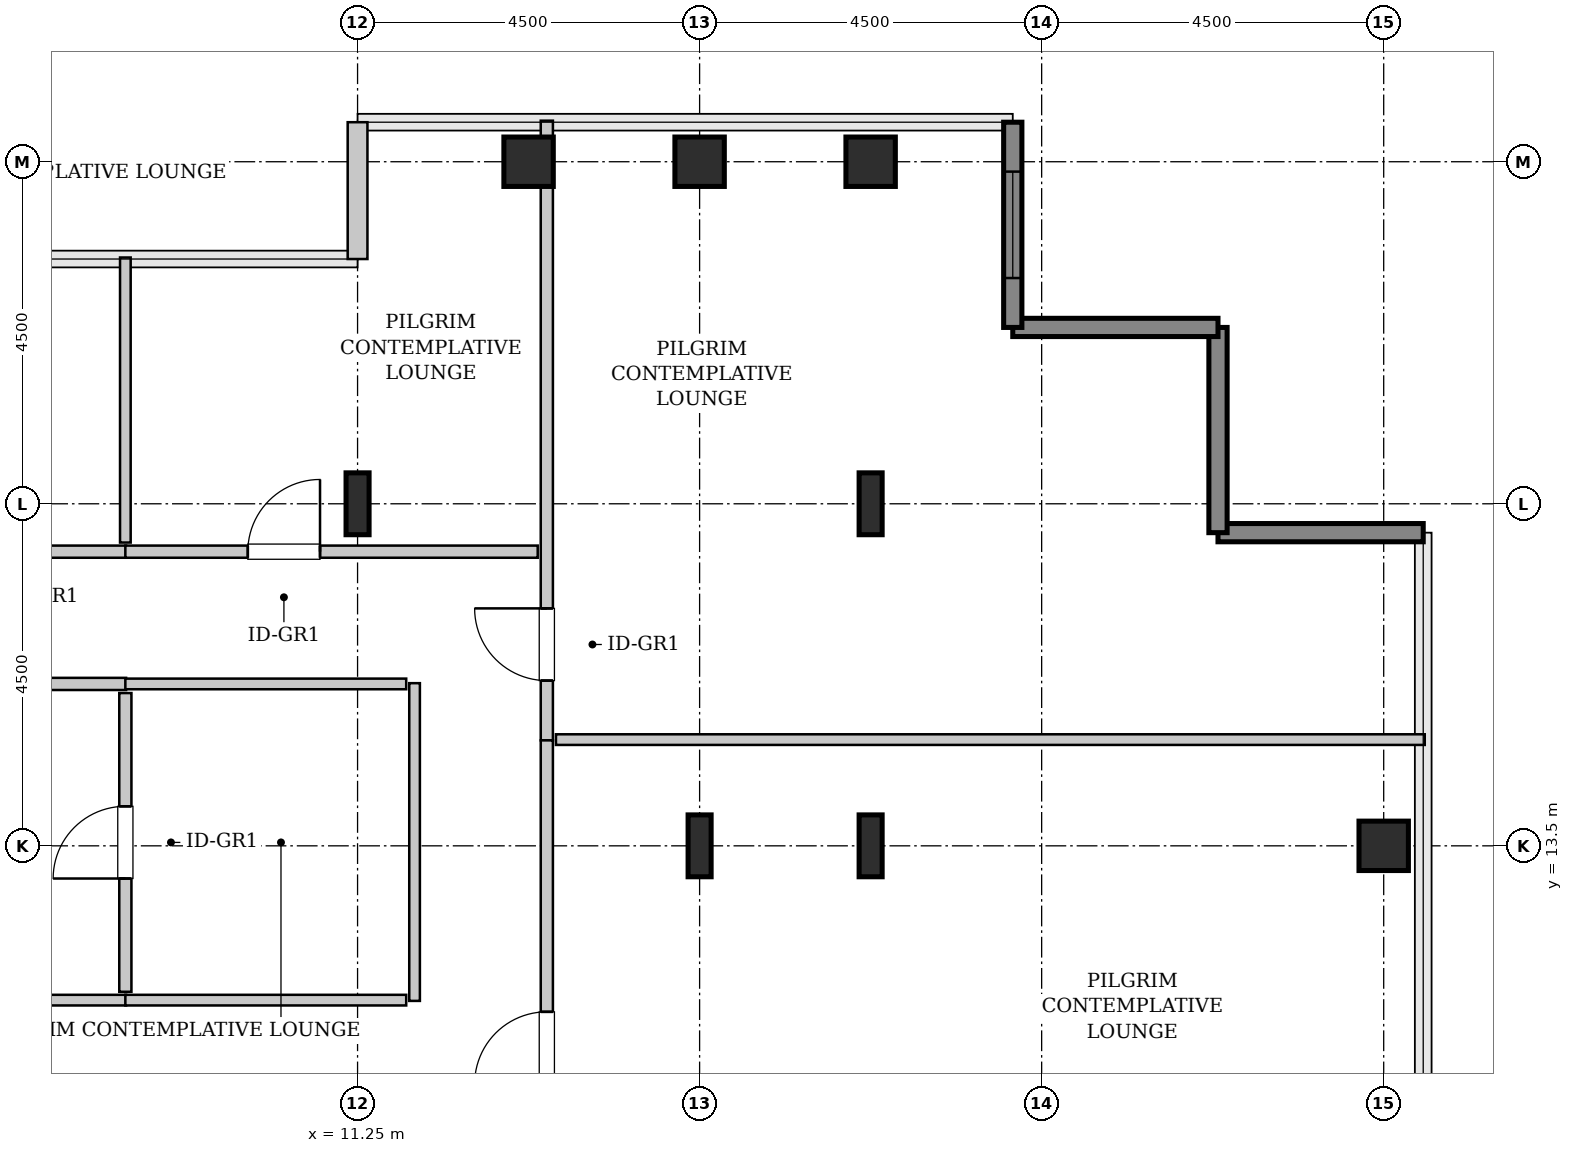
"""IFC4 building model, lengths in metres.
Left out: names, types, materials, properties, quantities, classifications, styles, units other than length and angle.
Written with IfcOpenShell. Run it as: python <this file> out.ifc"""

import sys

from ifc_helpers import new_model, si_unit, direction, frame, frame_2d, origin, origin_2d, place, context, subcontext, project, spatial, rectangle, hollow_rectangle, i_section, extrude, source, transform, mapped, element, fill, save


model = new_model("IFC4")
c1 = context("Model", 3, precision=1e-05, world=origin(), true_north=direction((0.0, 1.0)))
c2 = subcontext(c1, "Body", "Model", "MODEL_VIEW")
j1 = project(units=[si_unit("LENGTHUNIT", "METRE"), si_unit("PLANEANGLEUNIT", "RADIAN")], contexts=[c1])
p1 = place(None, origin())
s1 = spatial("IfcSite", under=j1, at=p1, CompositionType="ELEMENT")
p2 = place(p1, origin())
s2 = spatial("IfcBuilding", under=s1, at=p2, CompositionType="ELEMENT")
p3 = place(p2, frame((0.0, 0.0, 214.2)))
s3 = spatial("IfcBuildingStorey", under=s2, at=p3, CompositionType="ELEMENT", Elevation=214.2)
m1 = source(origin(), c2, "Body", "SweptSolid", [
    extrude(i_section(OverallWidth=0.303, OverallDepth=0.814, WebThickness=0.021, FlangeThickness=0.04, FilletRadius=0.03, at=origin_2d()), origin(), (0.0, 0.0, 1.0), 3.8),
])
p4 = place(p3, frame((11.25, 18.0, 0.0), z_axis=(0.0, 0.0, 1.0), x_axis=(1.0, 0.0, 0.0)))
e1 = element("IfcColumn", 1, at=p4, inside=s3, PredefinedType="COLUMN", context=c2, shape_type="MappedRepresentation", body=[
    mapped(m1, transform((0.0, 0.0, 0.0), x_axis=(1.0, 0.0, 0.0), y_axis=(0.0, 1.0, 0.0), z_axis=(0.0, 0.0, 1.0), scale=1.0)),
])
m2 = source(origin(), c2, "Body", "SweptSolid", [
    extrude(hollow_rectangle(XDim=0.65, YDim=0.65, WallThickness=0.032, InnerFilletRadius=0.032, OuterFilletRadius=0.064, at=origin_2d()), origin(), (0.0, 0.0, 1.0), 3.8),
])
p5 = place(p3, frame((13.5, 22.5, 0.0), z_axis=(0.0, 0.0, 1.0), x_axis=(1.0, 0.0, 0.0)))
e2 = element("IfcColumn", 2, at=p5, inside=s3, PredefinedType="COLUMN", context=c2, shape_type="MappedRepresentation", body=[
    mapped(m2, transform((0.0, 0.0, 0.0), x_axis=(1.0, 0.0, 0.0), y_axis=(0.0, 1.0, 0.0), z_axis=(0.0, 0.0, 1.0), scale=1.0)),
])
p6 = place(p3, frame((15.75, 13.5, 0.0), z_axis=(0.0, 0.0, 1.0), x_axis=(1.0, 0.0, 0.0)))
e3 = element("IfcColumn", 3, at=p6, inside=s3, PredefinedType="COLUMN", context=c2, shape_type="MappedRepresentation", body=[
    mapped(m1, transform((0.0, 0.0, 0.0), x_axis=(1.0, 0.0, 0.0), y_axis=(0.0, 1.0, 0.0), z_axis=(0.0, 0.0, 1.0), scale=1.0)),
])
p7 = place(p3, frame((15.75, 22.5, 0.0), z_axis=(0.0, 0.0, 1.0), x_axis=(1.0, 0.0, 0.0)))
e4 = element("IfcColumn", 4, at=p7, inside=s3, PredefinedType="COLUMN", context=c2, shape_type="MappedRepresentation", body=[
    mapped(m2, transform((0.0, 0.0, 0.0), x_axis=(1.0, 0.0, 0.0), y_axis=(0.0, 1.0, 0.0), z_axis=(0.0, 0.0, 1.0), scale=1.0)),
])
for number, where, z_axis, x_axis in (
    (5, (18.0, 13.5, 0.0), (0.0, 0.0, 1.0), (1.0, 0.0, 0.0)),
    (6, (18.0, 18.0, 0.0), (0.0, 0.0, 1.0), (1.0, 0.0, 0.0)),
):
    element("IfcColumn", number, at=place(p3, frame(where, z_axis=z_axis, x_axis=x_axis)), inside=s3, PredefinedType="COLUMN", context=c2, shape_type="MappedRepresentation", body=[
        mapped(m1, transform((0.0, 0.0, 0.0), x_axis=(1.0, 0.0, 0.0), y_axis=(0.0, 1.0, 0.0), z_axis=(0.0, 0.0, 1.0), scale=1.0)),
    ])
for number, where, z_axis, x_axis in (
    (7, (18.0, 22.5, 0.0), (0.0, 0.0, 1.0), (1.0, 0.0, 0.0)),
    (8, (24.75, 13.5, 0.0), (0.0, 0.0, 1.0), (1.0, 0.0, 0.0)),
):
    element("IfcColumn", number, at=place(p3, frame(where, z_axis=z_axis, x_axis=x_axis)), inside=s3, PredefinedType="COLUMN", context=c2, shape_type="MappedRepresentation", body=[
        mapped(m2, transform((0.0, 0.0, 0.0), x_axis=(1.0, 0.0, 0.0), y_axis=(0.0, 1.0, 0.0), z_axis=(0.0, 0.0, 1.0), scale=1.0)),
    ])
m3 = source(origin(), c2, "Body", "SweptSolid", [
    extrude(rectangle(XDim=2.7, YDim=0.24, at=frame_2d((1.35, 0.0))), origin(), (0.0, 0.0, 1.0), 3.55),
])
for number, where, z_axis, x_axis in (
    (9, (25.27, 17.62, 0.0), (0.0, 0.0, 1.0), (-1.0, 0.0, 0.0)),
    (10, (22.57, 17.62, 0.0), (0.0, 0.0, 1.0), (0.0, 1.0, 0.0)),
    (11, (22.57, 20.32, 0.0), (0.0, 0.0, 1.0), (-1.0, 0.0, 0.0)),
):
    element("IfcWall", number, at=place(p3, frame(where, z_axis=z_axis, x_axis=x_axis)), inside=s3, PredefinedType="SHEAR", context=c2, shape_type="MappedRepresentation", body=[
        mapped(m3, transform((0.0, 0.0, 0.0), x_axis=(1.0, 0.0, 0.0), y_axis=(0.0, 1.0, 0.0), z_axis=(0.0, 0.0, 1.0), scale=1.0)),
    ])
p8 = place(p3, frame((19.87, 20.32, 0.0), z_axis=(0.0, 0.0, 1.0), x_axis=(0.0, 1.0, 0.0)))
e12 = element("IfcWall", 12, at=p8, inside=s3, PredefinedType="SHEAR", context=c2, shape_type="MappedRepresentation", body=[
    mapped(m3, transform((0.0, 0.0, 0.0), x_axis=(1.0, 0.0, 0.0), y_axis=(0.0, 1.0, 0.0), z_axis=(0.0, 0.0, 1.0), scale=1.0)),
])
p9 = place(p8, frame((0.65, 0.0, 0.85)))
e13 = element("IfcOpeningElement", 13, at=p9, cuts=e12, PredefinedType="OPENING", context=c2, shape_type="SweptSolid", body=[
    extrude(rectangle(XDim=1.4, YDim=1.8, at=frame_2d((0.7, 0.9))), frame((0.0, 0.13, 0.0), z_axis=(0.0, -1.0, 0.0), x_axis=(1.0, 0.0, 0.0)), (0.0, 0.0, 1.0), 0.26),
])
m4 = source(origin(), c2, "Body", "SweptSolid", [
    extrude(rectangle(XDim=1.8, YDim=0.26, at=frame_2d((0.9, 0.0))), origin(), (0.0, 0.0, 1.0), 3.55),
])
p10 = place(p3, frame((11.25, 23.02, 0.0), z_axis=(0.0, 0.0, 1.0), x_axis=(0.0, -1.0, 0.0)))
e14 = element("IfcWall", 14, at=p10, inside=s3, PredefinedType="SOLIDWALL", context=c2, shape_type="MappedRepresentation", body=[
    mapped(m4, transform((0.0, 0.0, 0.0), x_axis=(1.0, 0.0, 0.0), y_axis=(0.0, 1.0, 0.0), z_axis=(0.0, 0.0, 1.0), scale=1.0)),
])
m5 = source(origin(), c2, "Body", "SweptSolid", [
    extrude(rectangle(XDim=8.153, YDim=0.16, at=frame_2d((4.076, 0.0))), origin(), (0.0, 0.0, 1.0), 3.535),
])
p11 = place(p3, frame((13.74, 14.887, 0.0), z_axis=(0.0, 0.0, 1.0), x_axis=(0.0, 1.0, 0.0)))
e15 = element("IfcWall", 15, at=p11, inside=s3, PredefinedType="PARTITIONING", context=c2, shape_type="MappedRepresentation", body=[
    mapped(m5, transform((0.0, 0.0, 0.0), x_axis=(1.0, 0.0, 0.0), y_axis=(0.0, 1.0, 0.0), z_axis=(0.0, 0.0, 1.0), scale=1.0)),
])
p12 = place(p11, frame((0.786, 0.0, 0.0)))
e16 = element("IfcOpeningElement", 16, at=p12, cuts=e15, PredefinedType="OPENING", context=c2, shape_type="SweptSolid", body=[
    extrude(rectangle(XDim=0.95, YDim=2.1, at=frame_2d((0.475, 1.05))), frame((0.0, 0.09, 0.0), z_axis=(0.0, -1.0, 0.0), x_axis=(1.0, 0.0, 0.0)), (0.0, 0.0, 1.0), 0.18),
])
m6 = source(origin(), c2, "Body", "SweptSolid", [
    extrude(rectangle(XDim=11.43, YDim=0.14, at=frame_2d((5.715, 0.0))), origin(), (0.0, 0.0, 1.0), 3.535),
])
p13 = place(p3, frame((13.86, 14.897, 0.0), z_axis=(0.0, 0.0, 1.0), x_axis=(1.0, 0.0, 0.0)))
e17 = element("IfcWall", 17, at=p13, inside=s3, PredefinedType="PARTITIONING", context=c2, shape_type="MappedRepresentation", body=[
    mapped(m6, transform((0.0, 0.0, 0.0), x_axis=(1.0, 0.0, 0.0), y_axis=(0.0, 1.0, 0.0), z_axis=(0.0, 0.0, 1.0), scale=1.0)),
])
m7 = source(origin(), c2, "Body", "SweptSolid", [
    extrude(rectangle(XDim=8.093, YDim=0.16, at=frame_2d((4.046, 0.0))), origin(), (0.0, 0.0, 1.0), 3.535),
])
p14 = place(p3, frame((13.74, 6.795, 0.0), z_axis=(0.0, 0.0, 1.0), x_axis=(0.0, 1.0, 0.0)))
e18 = element("IfcWall", 18, at=p14, inside=s3, PredefinedType="PARTITIONING", context=c2, shape_type="MappedRepresentation", body=[
    mapped(m7, transform((0.0, 0.0, 0.0), x_axis=(1.0, 0.0, 0.0), y_axis=(0.0, 1.0, 0.0), z_axis=(0.0, 0.0, 1.0), scale=1.0)),
])
p15 = place(p14, frame((3.571, 0.0, 0.0)))
e19 = element("IfcOpeningElement", 19, at=p15, cuts=e18, PredefinedType="OPENING", context=c2, shape_type="SweptSolid", body=[
    extrude(rectangle(XDim=0.95, YDim=2.1, at=frame_2d((0.475, 1.05))), frame((0.0, 0.09, 0.0), z_axis=(0.0, -1.0, 0.0), x_axis=(1.0, 0.0, 0.0)), (0.0, 0.0, 1.0), 0.18),
])
m8 = source(origin(), c2, "Body", "SweptSolid", [
    extrude(rectangle(XDim=5.61, YDim=0.16, at=frame_2d((2.805, 0.0))), origin(), (0.0, 0.0, 1.0), 3.535),
])
p16 = place(p3, frame((2.595, 17.37, 0.0), z_axis=(0.0, 0.0, 1.0), x_axis=(1.0, 0.0, 0.0)))
e20 = element("IfcWall", 20, at=p16, inside=s3, PredefinedType="PARTITIONING", context=c2, shape_type="MappedRepresentation", body=[
    mapped(m8, transform((0.0, 0.0, 0.0), x_axis=(1.0, 0.0, 0.0), y_axis=(0.0, 1.0, 0.0), z_axis=(0.0, 0.0, 1.0), scale=1.0)),
])
p17 = place(p16, frame((2.33, 0.0, 0.0)))
e21 = element("IfcOpeningElement", 21, at=p17, cuts=e20, PredefinedType="OPENING", context=c2, shape_type="SweptSolid", body=[
    extrude(rectangle(XDim=0.95, YDim=2.1, at=frame_2d((0.475, 1.05))), frame((0.0, 0.09, 0.0), z_axis=(0.0, -1.0, 0.0), x_axis=(1.0, 0.0, 0.0)), (0.0, 0.0, 1.0), 0.18),
])
m9 = source(origin(), c2, "Body", "SweptSolid", [
    extrude(rectangle(XDim=3.75, YDim=0.14, at=frame_2d((1.875, 0.0))), origin(), (0.0, 0.0, 1.0), 3.535),
])
p18 = place(p3, frame((8.195, 17.49, 0.0), z_axis=(0.0, 0.0, 1.0), x_axis=(0.0, 1.0, 0.0)))
e22 = element("IfcWall", 22, at=p18, inside=s3, PredefinedType="PARTITIONING", context=c2, shape_type="MappedRepresentation", body=[
    mapped(m9, transform((0.0, 0.0, 0.0), x_axis=(1.0, 0.0, 0.0), y_axis=(0.0, 1.0, 0.0), z_axis=(0.0, 0.0, 1.0), scale=1.0)),
])
p19 = place(p3, frame((2.595, 15.63, 0.0), z_axis=(0.0, 0.0, 1.0), x_axis=(1.0, 0.0, 0.0)))
e23 = element("IfcWall", 23, at=p19, inside=s3, PredefinedType="PARTITIONING", context=c2, shape_type="MappedRepresentation", body=[
    mapped(m8, transform((0.0, 0.0, 0.0), x_axis=(1.0, 0.0, 0.0), y_axis=(0.0, 1.0, 0.0), z_axis=(0.0, 0.0, 1.0), scale=1.0)),
])
p20 = place(p19, frame((2.33, 0.0, 0.0)))
e24 = element("IfcOpeningElement", 24, at=p20, cuts=e23, PredefinedType="OPENING", context=c2, shape_type="SweptSolid", body=[
    extrude(rectangle(XDim=0.95, YDim=2.1, at=frame_2d((0.475, 1.05))), frame((0.0, 0.09, 0.0), z_axis=(0.0, -1.0, 0.0), x_axis=(1.0, 0.0, 0.0)), (0.0, 0.0, 1.0), 0.18),
])
m10 = source(origin(), c2, "Body", "SweptSolid", [
    extrude(rectangle(XDim=5.61, YDim=0.14, at=frame_2d((2.805, 0.0))), origin(), (0.0, 0.0, 1.0), 3.535),
])
p21 = place(p3, frame((2.595, 11.47, 0.0), z_axis=(0.0, 0.0, 1.0), x_axis=(1.0, 0.0, 0.0)))
e25 = element("IfcWall", 25, at=p21, inside=s3, PredefinedType="PARTITIONING", context=c2, shape_type="MappedRepresentation", body=[
    mapped(m10, transform((0.0, 0.0, 0.0), x_axis=(1.0, 0.0, 0.0), y_axis=(0.0, 1.0, 0.0), z_axis=(0.0, 0.0, 1.0), scale=1.0)),
])
m11 = source(origin(), c2, "Body", "SweptSolid", [
    extrude(rectangle(XDim=3.93, YDim=0.16, at=frame_2d((1.965, 0.0))), origin(), (0.0, 0.0, 1.0), 3.535),
])
p22 = place(p3, frame((8.195, 11.58, 0.0), z_axis=(0.0, 0.0, 1.0), x_axis=(0.0, 1.0, 0.0)))
e26 = element("IfcWall", 26, at=p22, inside=s3, PredefinedType="PARTITIONING", context=c2, shape_type="MappedRepresentation", body=[
    mapped(m11, transform((0.0, 0.0, 0.0), x_axis=(1.0, 0.0, 0.0), y_axis=(0.0, 1.0, 0.0), z_axis=(0.0, 0.0, 1.0), scale=1.0)),
])
p23 = place(p22, frame((1.49, 0.0, 0.0)))
e27 = element("IfcOpeningElement", 27, at=p23, cuts=e26, PredefinedType="OPENING", context=c2, shape_type="SweptSolid", body=[
    extrude(rectangle(XDim=0.95, YDim=2.1, at=frame_2d((0.475, 1.05))), frame((0.0, 0.09, 0.0), z_axis=(0.0, -1.0, 0.0), x_axis=(1.0, 0.0, 0.0)), (0.0, 0.0, 1.0), 0.18),
])
m12 = source(origin(), c2, "Body", "SweptSolid", [
    extrude(rectangle(XDim=5.425, YDim=0.16, at=frame_2d((2.712, 0.0))), origin(), (0.0, 0.0, 1.0), 3.535),
])
p24 = place(p3, frame((8.195, 17.37, 0.0), z_axis=(0.0, 0.0, 1.0), x_axis=(1.0, 0.0, 0.0)))
e28 = element("IfcWall", 28, at=p24, inside=s3, PredefinedType="PARTITIONING", context=c2, shape_type="MappedRepresentation", body=[
    mapped(m12, transform((0.0, 0.0, 0.0), x_axis=(1.0, 0.0, 0.0), y_axis=(0.0, 1.0, 0.0), z_axis=(0.0, 0.0, 1.0), scale=1.0)),
])
p25 = place(p24, frame((1.611, 0.0, 0.0)))
e29 = element("IfcOpeningElement", 29, at=p25, cuts=e28, PredefinedType="OPENING", context=c2, shape_type="SweptSolid", body=[
    extrude(rectangle(XDim=0.95, YDim=2.1, at=frame_2d((0.475, 1.05))), frame((0.0, 0.09, 0.0), z_axis=(0.0, -1.0, 0.0), x_axis=(1.0, 0.0, 0.0)), (0.0, 0.0, 1.0), 0.18),
])
m13 = source(origin(), c2, "Body", "SweptSolid", [
    extrude(rectangle(XDim=4.18, YDim=0.14, at=frame_2d((2.09, 0.0))), origin(), (0.0, 0.0, 1.0), 3.535),
])
p26 = place(p3, frame((12.0, 11.46, 0.0), z_axis=(0.0, 0.0, 1.0), x_axis=(0.0, 1.0, 0.0)))
e30 = element("IfcWall", 30, at=p26, inside=s3, PredefinedType="PARTITIONING", context=c2, shape_type="MappedRepresentation", body=[
    mapped(m13, transform((0.0, 0.0, 0.0), x_axis=(1.0, 0.0, 0.0), y_axis=(0.0, 1.0, 0.0), z_axis=(0.0, 0.0, 1.0), scale=1.0)),
])
m14 = source(origin(), c2, "Body", "SweptSolid", [
    extrude(rectangle(XDim=3.695, YDim=0.14, at=frame_2d((1.847, 0.0))), origin(), (0.0, 0.0, 1.0), 3.535),
])
for number, where, z_axis, x_axis in (
    (31, (8.195, 15.63, 0.0), (0.0, 0.0, 1.0), (1.0, 0.0, 0.0)),
    (32, (8.195, 11.47, 0.0), (0.0, 0.0, 1.0), (1.0, 0.0, 0.0)),
):
    element("IfcWall", number, at=place(p3, frame(where, z_axis=z_axis, x_axis=x_axis)), inside=s3, PredefinedType="PARTITIONING", context=c2, shape_type="MappedRepresentation", body=[
        mapped(m14, transform((0.0, 0.0, 0.0), x_axis=(1.0, 0.0, 0.0), y_axis=(0.0, 1.0, 0.0), z_axis=(0.0, 0.0, 1.0), scale=1.0)),
    ])
m15 = source(origin(), c2, "Body", "SweptSolid", [
    extrude(rectangle(XDim=1.4, YDim=1.8, at=frame_2d((0.7, 0.9))), frame((0.0, 0.03, 0.0), z_axis=(0.0, -1.0, 0.0), x_axis=(1.0, 0.0, 0.0)), (0.0, 0.0, 1.0), 0.06),
])
p27 = place(p9, origin())
e33 = element("IfcWindow", 33, at=p27, inside=s3, PartitioningType="SINGLE_PANEL", PredefinedType="WINDOW", context=c2, shape_type="MappedRepresentation", body=[
    mapped(m15, transform((0.0, 0.0, 0.0), x_axis=(1.0, 0.0, 0.0), y_axis=(0.0, 1.0, 0.0), z_axis=(0.0, 0.0, 1.0), scale=1.0)),
])
fill(e13, e33)
m16 = source(origin(), c2, "Body", "SweptSolid", [
    extrude(rectangle(XDim=0.95, YDim=2.1, at=frame_2d((0.475, 1.05))), frame((0.0, 0.025, 0.0), z_axis=(0.0, -1.0, 0.0), x_axis=(1.0, 0.0, 0.0)), (0.0, 0.0, 1.0), 0.05),
])
p28 = place(p12, origin())
e34 = element("IfcDoor", 34, at=p28, inside=s3, OperationType="SINGLE_SWING_RIGHT", PredefinedType="DOOR", context=c2, shape_type="MappedRepresentation", body=[
    mapped(m16, transform((0.0, 0.0, 0.0), x_axis=(1.0, 0.0, 0.0), y_axis=(0.0, 1.0, 0.0), z_axis=(0.0, 0.0, 1.0), scale=1.0)),
])
fill(e16, e34)
p29 = place(p15, origin())
e35 = element("IfcDoor", 35, at=p29, inside=s3, OperationType="SINGLE_SWING_LEFT", PredefinedType="DOOR", context=c2, shape_type="MappedRepresentation", body=[
    mapped(m16, transform((0.0, 0.0, 0.0), x_axis=(1.0, 0.0, 0.0), y_axis=(0.0, 1.0, 0.0), z_axis=(0.0, 0.0, 1.0), scale=1.0)),
])
fill(e19, e35)
p30 = place(p23, origin())
e36 = element("IfcDoor", 36, at=p30, inside=s3, OperationType="SINGLE_SWING_LEFT", PredefinedType="DOOR", context=c2, shape_type="MappedRepresentation", body=[
    mapped(m16, transform((0.0, 0.0, 0.0), x_axis=(1.0, 0.0, 0.0), y_axis=(0.0, 1.0, 0.0), z_axis=(0.0, 0.0, 1.0), scale=1.0)),
])
fill(e27, e36)
p31 = place(p25, origin())
e37 = element("IfcDoor", 37, at=p31, inside=s3, OperationType="SINGLE_SWING_RIGHT", PredefinedType="DOOR", context=c2, shape_type="MappedRepresentation", body=[
    mapped(m16, transform((0.0, 0.0, 0.0), x_axis=(1.0, 0.0, 0.0), y_axis=(0.0, 1.0, 0.0), z_axis=(0.0, 0.0, 1.0), scale=1.0)),
])
fill(e29, e37)
save(model, sys.argv[1])
